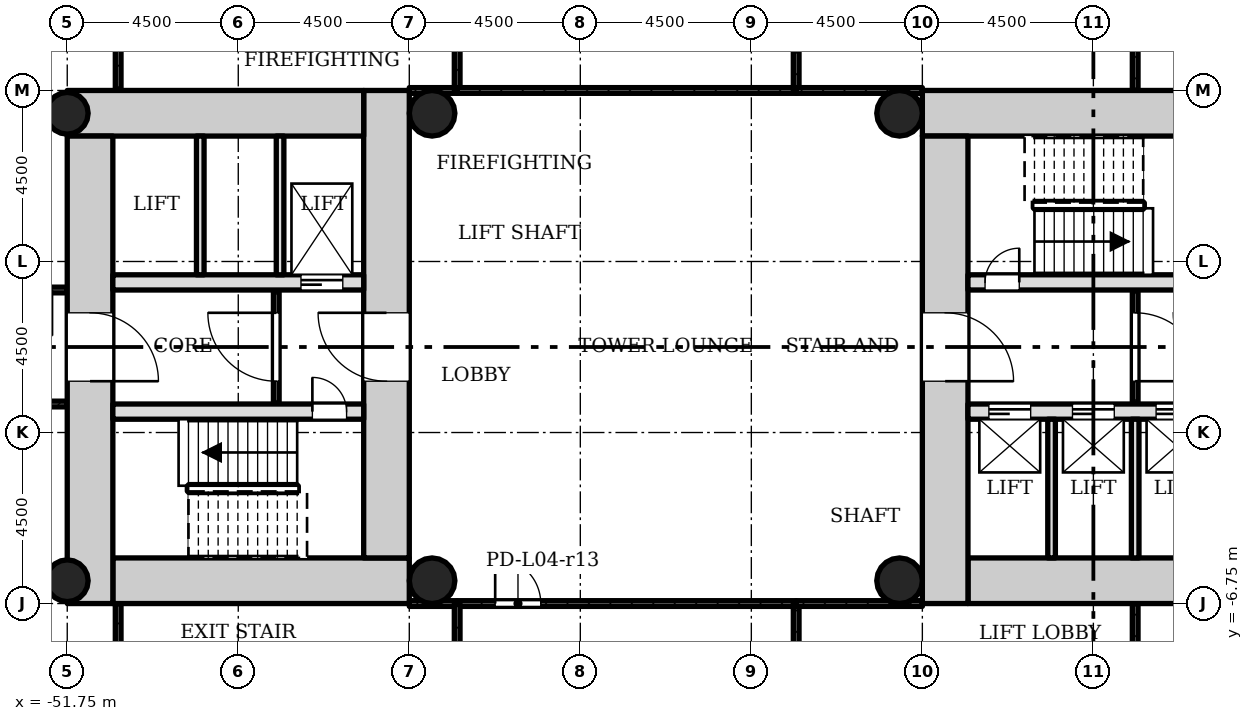
"""IFC4 building model, lengths in metres.
Left out: names, types, materials, properties, quantities, classifications, styles, units other than length and angle.
Written with IfcOpenShell. Run it as: python <this file> out.ifc"""

import sys

from ifc_helpers import new_model, si_unit, direction, frame, frame_2d, origin, origin_2d, place, context, subcontext, project, spatial, rectangle, hollow_circle, extrude, element, fill, save


model = new_model("IFC4")
c1 = context("Model", 3, precision=1e-05, world=origin(), true_north=direction((0.0, 1.0)))
c2 = subcontext(c1, "Body", "Model", "MODEL_VIEW")
j1 = project(units=[si_unit("LENGTHUNIT", "METRE"), si_unit("PLANEANGLEUNIT", "RADIAN")], contexts=[c1])
p1 = place(None, origin())
s1 = spatial("IfcSite", under=j1, at=p1, CompositionType="ELEMENT")
p2 = place(p1, origin())
s2 = spatial("IfcBuilding", under=s1, at=p2, CompositionType="ELEMENT")
p3 = place(p2, frame((0.0, 0.0, 20.0)))
s3 = spatial("IfcBuildingStorey", under=s2, at=p3, CompositionType="ELEMENT", Elevation=20.0)
for number, where, z_axis, x_axis in (
    (1, (-28.05, -6.15, 0.0), (0.0, 0.0, 1.0), (1.0, 0.0, 0.0)),
    (2, (-21.45, 6.15, 0.0), (0.0, 0.0, 1.0), (-1.0, 0.0, 0.0)),
):
    element("IfcWall", number, at=place(p3, frame(where, z_axis=z_axis, x_axis=x_axis)), inside=s3, PredefinedType="SHEAR", context=c2, shape_type="SweptSolid", body=[
        extrude(rectangle(XDim=7.8, YDim=1.2, at=frame_2d((3.9, 0.0))), origin(), (0.0, 0.0, 1.0), 4.5),
    ])
p4 = place(p3, frame((-28.65, 5.55, 0.0), z_axis=(0.0, 0.0, 1.0), x_axis=(0.0, -1.0, 0.0)))
e3 = element("IfcWall", 3, at=p4, inside=s3, PredefinedType="SHEAR", context=c2, shape_type="SweptSolid", body=[
    extrude(rectangle(XDim=12.3, YDim=1.2, at=frame_2d((6.15, 0.0))), origin(), (0.0, 0.0, 1.0), 4.5),
])
p5 = place(p4, frame((4.65, 0.0, 0.0)))
e4 = element("IfcOpeningElement", 4, at=p5, cuts=e3, PredefinedType="OPENING", context=c2, shape_type="SweptSolid", body=[
    extrude(rectangle(XDim=1.8, YDim=2.1, at=frame_2d((0.9, 1.05))), frame((0.0, 0.61, 0.0), z_axis=(0.0, -1.0, 0.0), x_axis=(1.0, 0.0, 0.0)), (0.0, 0.0, 1.0), 1.22),
])
p6 = place(p3, frame((-28.05, -1.7, 0.0), z_axis=(0.0, 0.0, 1.0), x_axis=(1.0, 0.0, 0.0)))
e5 = element("IfcWall", 5, at=p6, inside=s3, PredefinedType="SHEAR", context=c2, shape_type="SweptSolid", body=[
    extrude(rectangle(XDim=6.6, YDim=0.4, at=frame_2d((3.3, 0.0))), origin(), (0.0, 0.0, 1.0), 4.5),
])
p7 = place(p6, frame((0.55, 0.0, 0.0)))
e6 = element("IfcOpeningElement", 6, at=p7, cuts=e5, PredefinedType="OPENING", context=c2, shape_type="SweptSolid", body=[
    extrude(rectangle(XDim=1.1, YDim=2.1, at=frame_2d((0.55, 1.05))), frame((0.0, 0.21, 0.0), z_axis=(0.0, -1.0, 0.0), x_axis=(1.0, 0.0, 0.0)), (0.0, 0.0, 1.0), 0.42),
])
p8 = place(p6, frame((2.75, 0.0, 0.0)))
e7 = element("IfcOpeningElement", 7, at=p8, cuts=e5, PredefinedType="OPENING", context=c2, shape_type="SweptSolid", body=[
    extrude(rectangle(XDim=1.1, YDim=2.1, at=frame_2d((0.55, 1.05))), frame((0.0, 0.21, 0.0), z_axis=(0.0, -1.0, 0.0), x_axis=(1.0, 0.0, 0.0)), (0.0, 0.0, 1.0), 0.42),
])
p9 = place(p6, frame((4.95, 0.0, 0.0)))
e8 = element("IfcOpeningElement", 8, at=p9, cuts=e5, PredefinedType="OPENING", context=c2, shape_type="SweptSolid", body=[
    extrude(rectangle(XDim=1.1, YDim=2.1, at=frame_2d((0.55, 1.05))), frame((0.0, 0.21, 0.0), z_axis=(0.0, -1.0, 0.0), x_axis=(1.0, 0.0, 0.0)), (0.0, 0.0, 1.0), 0.42),
])
p10 = place(p3, frame((-28.05, 1.7, 0.0), z_axis=(0.0, 0.0, 1.0), x_axis=(1.0, 0.0, 0.0)))
e9 = element("IfcWall", 9, at=p10, inside=s3, PredefinedType="SHEAR", context=c2, shape_type="SweptSolid", body=[
    extrude(rectangle(XDim=6.6, YDim=0.4, at=frame_2d((3.3, 0.0))), origin(), (0.0, 0.0, 1.0), 4.5),
])
p11 = place(p10, frame((0.45, 0.0, 0.0)))
e10 = element("IfcOpeningElement", 10, at=p11, cuts=e9, PredefinedType="OPENING", context=c2, shape_type="SweptSolid", body=[
    extrude(rectangle(XDim=0.9, YDim=2.1, at=frame_2d((0.45, 1.05))), frame((0.0, 0.21, 0.0), z_axis=(0.0, -1.0, 0.0), x_axis=(1.0, 0.0, 0.0)), (0.0, 0.0, 1.0), 0.42),
])
p12 = place(p3, frame((-50.55, -6.15, 0.0), z_axis=(0.0, 0.0, 1.0), x_axis=(1.0, 0.0, 0.0)))
e11 = element("IfcWall", 11, at=p12, inside=s3, PredefinedType="SHEAR", context=c2, shape_type="SweptSolid", body=[
    extrude(rectangle(XDim=7.8, YDim=1.2, at=frame_2d((3.9, 0.0))), origin(), (0.0, 0.0, 1.0), 4.5),
])
p13 = place(p3, frame((-43.35, -5.55, 0.0), z_axis=(0.0, 0.0, 1.0), x_axis=(0.0, 1.0, 0.0)))
e12 = element("IfcWall", 12, at=p13, inside=s3, PredefinedType="SHEAR", context=c2, shape_type="SweptSolid", body=[
    extrude(rectangle(XDim=12.3, YDim=1.2, at=frame_2d((6.15, 0.0))), origin(), (0.0, 0.0, 1.0), 4.5),
])
p14 = place(p13, frame((4.65, 0.0, 0.0)))
e13 = element("IfcOpeningElement", 13, at=p14, cuts=e12, PredefinedType="OPENING", context=c2, shape_type="SweptSolid", body=[
    extrude(rectangle(XDim=1.8, YDim=2.1, at=frame_2d((0.9, 1.05))), frame((0.0, 0.61, 0.0), z_axis=(0.0, -1.0, 0.0), x_axis=(1.0, 0.0, 0.0)), (0.0, 0.0, 1.0), 1.22),
])
p15 = place(p3, frame((-43.95, 6.15, 0.0), z_axis=(0.0, 0.0, 1.0), x_axis=(-1.0, 0.0, 0.0)))
e14 = element("IfcWall", 14, at=p15, inside=s3, PredefinedType="SHEAR", context=c2, shape_type="SweptSolid", body=[
    extrude(rectangle(XDim=7.8, YDim=1.2, at=frame_2d((3.9, 0.0))), origin(), (0.0, 0.0, 1.0), 4.5),
])
p16 = place(p3, frame((-51.15, 5.55, 0.0), z_axis=(0.0, 0.0, 1.0), x_axis=(0.0, -1.0, 0.0)))
e15 = element("IfcWall", 15, at=p16, inside=s3, PredefinedType="SHEAR", context=c2, shape_type="SweptSolid", body=[
    extrude(rectangle(XDim=12.3, YDim=1.2, at=frame_2d((6.15, 0.0))), origin(), (0.0, 0.0, 1.0), 4.5),
])
p17 = place(p16, frame((4.65, 0.0, 0.0)))
e16 = element("IfcOpeningElement", 16, at=p17, cuts=e15, PredefinedType="OPENING", context=c2, shape_type="SweptSolid", body=[
    extrude(rectangle(XDim=1.8, YDim=2.1, at=frame_2d((0.9, 1.05))), frame((0.0, 0.61, 0.0), z_axis=(0.0, -1.0, 0.0), x_axis=(1.0, 0.0, 0.0)), (0.0, 0.0, 1.0), 1.22),
])
p18 = place(p3, frame((-50.55, -1.7, 0.0), z_axis=(0.0, 0.0, 1.0), x_axis=(1.0, 0.0, 0.0)))
e17 = element("IfcWall", 17, at=p18, inside=s3, PredefinedType="SHEAR", context=c2, shape_type="SweptSolid", body=[
    extrude(rectangle(XDim=6.6, YDim=0.4, at=frame_2d((3.3, 0.0))), origin(), (0.0, 0.0, 1.0), 4.5),
])
p19 = place(p18, frame((5.25, 0.0, 0.0)))
e18 = element("IfcOpeningElement", 18, at=p19, cuts=e17, PredefinedType="OPENING", context=c2, shape_type="SweptSolid", body=[
    extrude(rectangle(XDim=0.9, YDim=2.1, at=frame_2d((0.45, 1.05))), frame((0.0, 0.21, 0.0), z_axis=(0.0, -1.0, 0.0), x_axis=(1.0, 0.0, 0.0)), (0.0, 0.0, 1.0), 0.42),
])
p20 = place(p3, frame((-50.55, 1.7, 0.0), z_axis=(0.0, 0.0, 1.0), x_axis=(1.0, 0.0, 0.0)))
e19 = element("IfcWall", 19, at=p20, inside=s3, PredefinedType="SHEAR", context=c2, shape_type="SweptSolid", body=[
    extrude(rectangle(XDim=6.6, YDim=0.4, at=frame_2d((3.3, 0.0))), origin(), (0.0, 0.0, 1.0), 4.5),
])
p21 = place(p20, frame((4.95, 0.0, 0.0)))
e20 = element("IfcOpeningElement", 20, at=p21, cuts=e19, PredefinedType="OPENING", context=c2, shape_type="SweptSolid", body=[
    extrude(rectangle(XDim=1.1, YDim=2.1, at=frame_2d((0.55, 1.05))), frame((0.0, 0.21, 0.0), z_axis=(0.0, -1.0, 0.0), x_axis=(1.0, 0.0, 0.0)), (0.0, 0.0, 1.0), 0.42),
])
for number, where, z_axis, x_axis in (
    (21, (-51.75, -6.15, 0.0), (0.0, 0.0, 1.0), (1.0, 0.0, 0.0)),
    (22, (-51.75, 6.15, 0.0), (0.0, 0.0, 1.0), (1.0, 0.0, 0.0)),
):
    element("IfcColumn", number, at=place(p3, frame(where, z_axis=z_axis, x_axis=x_axis)), inside=s3, PredefinedType="COLUMN", context=c2, shape_type="SweptSolid", body=[
        extrude(hollow_circle(Radius=0.55, WallThickness=0.04, at=origin_2d()), origin(), (0.0, 0.0, 1.0), 4.5),
    ])
for number, where, z_axis, x_axis in (
    (23, (-42.15, -6.15, 0.0), (0.0, 0.0, 1.0), (1.0, 0.0, 0.0)),
    (24, (-29.85, -6.15, 0.0), (0.0, 0.0, 1.0), (1.0, 0.0, 0.0)),
    (25, (-29.85, 6.15, 0.0), (0.0, 0.0, 1.0), (1.0, 0.0, 0.0)),
    (26, (-42.15, 6.15, 0.0), (0.0, 0.0, 1.0), (1.0, 0.0, 0.0)),
):
    element("IfcColumn", number, at=place(p3, frame(where, z_axis=z_axis, x_axis=x_axis)), inside=s3, PredefinedType="COLUMN", context=c2, shape_type="SweptSolid", body=[
        extrude(hollow_circle(Radius=0.6, WallThickness=0.045, at=origin_2d()), origin(), (0.0, 0.0, 1.0), 4.5),
    ])
p22 = place(p3, frame((-23.65, -1.5, 0.0), z_axis=(0.0, 0.0, 1.0), x_axis=(0.0, 1.0, 0.0)))
e27 = element("IfcWall", 27, at=p22, inside=s3, PredefinedType="PARTITIONING", context=c2, shape_type="SweptSolid", body=[
    extrude(rectangle(XDim=3.0, YDim=0.15, at=frame_2d((1.5, 0.0))), origin(), (0.0, 0.0, 1.0), 4.075),
])
p23 = place(p22, frame((0.6, 0.0, 0.0)))
e28 = element("IfcOpeningElement", 28, at=p23, cuts=e27, PredefinedType="OPENING", context=c2, shape_type="SweptSolid", body=[
    extrude(rectangle(XDim=1.8, YDim=2.1, at=frame_2d((0.9, 1.05))), frame((0.0, 0.085, 0.0), z_axis=(0.0, -1.0, 0.0), x_axis=(1.0, 0.0, 0.0)), (0.0, 0.0, 1.0), 0.17),
])
for number, where, z_axis, x_axis in (
    (29, (-25.85, -5.55, 0.0), (0.0, 0.0, 1.0), (0.0, 1.0, 0.0)),
    (30, (-23.65, -5.55, 0.0), (0.0, 0.0, 1.0), (0.0, 1.0, 0.0)),
):
    element("IfcWall", number, at=place(p3, frame(where, z_axis=z_axis, x_axis=x_axis)), inside=s3, PredefinedType="SOLIDWALL", context=c2, shape_type="SweptSolid", body=[
        extrude(rectangle(XDim=3.65, YDim=0.2, at=frame_2d((1.825, 0.0))), origin(), (0.0, 0.0, 1.0), 4.075),
    ])
p24 = place(p3, frame((-46.25, 1.5, 0.0), z_axis=(0.0, 0.0, 1.0), x_axis=(0.0, -1.0, 0.0)))
e31 = element("IfcWall", 31, at=p24, inside=s3, PredefinedType="PARTITIONING", context=c2, shape_type="SweptSolid", body=[
    extrude(rectangle(XDim=3.0, YDim=0.15, at=frame_2d((1.5, 0.0))), origin(), (0.0, 0.0, 1.0), 4.075),
])
p25 = place(p24, frame((0.6, 0.0, 0.0)))
e32 = element("IfcOpeningElement", 32, at=p25, cuts=e31, PredefinedType="OPENING", context=c2, shape_type="SweptSolid", body=[
    extrude(rectangle(XDim=1.8, YDim=2.1, at=frame_2d((0.9, 1.05))), frame((0.0, 0.085, 0.0), z_axis=(0.0, -1.0, 0.0), x_axis=(1.0, 0.0, 0.0)), (0.0, 0.0, 1.0), 0.17),
])
for number, where, z_axis, x_axis in (
    (33, (-46.15, 5.55, 0.0), (0.0, 0.0, 1.0), (0.0, -1.0, 0.0)),
    (34, (-48.25, 5.55, 0.0), (0.0, 0.0, 1.0), (0.0, -1.0, 0.0)),
):
    element("IfcWall", number, at=place(p3, frame(where, z_axis=z_axis, x_axis=x_axis)), inside=s3, PredefinedType="SOLIDWALL", context=c2, shape_type="SweptSolid", body=[
        extrude(rectangle(XDim=3.65, YDim=0.2, at=frame_2d((1.825, 0.0))), origin(), (0.0, 0.0, 1.0), 4.075),
    ])
p26 = place(p3, frame((-59.33, -1.5, 0.0), z_axis=(0.0, 0.0, 1.0), x_axis=(1.0, 0.0, 0.0)))
e35 = element("IfcWall", 35, at=p26, inside=s3, PredefinedType="PARTITIONING", context=c2, shape_type="SweptSolid", body=[
    extrude(rectangle(XDim=7.58, YDim=0.15, at=frame_2d((3.79, 0.0))), origin(), (0.0, 0.0, 1.0), 4.075),
])
p27 = place(p26, frame((0.4, 0.0, 0.0)))
e36 = element("IfcOpeningElement", 36, at=p27, cuts=e35, PredefinedType="OPENING", context=c2, shape_type="SweptSolid", body=[
    extrude(rectangle(XDim=1.2, YDim=2.1, at=frame_2d((0.6, 1.05))), frame((0.0, 0.085, 0.0), z_axis=(0.0, -1.0, 0.0), x_axis=(1.0, 0.0, 0.0)), (0.0, 0.0, 1.0), 0.17),
])
p28 = place(p3, frame((-50.41, -6.75, 0.0), z_axis=(0.0, 0.0, 1.0), x_axis=(0.0, -1.0, 0.0)))
e37 = element("IfcWall", 37, at=p28, inside=s3, PredefinedType="PARTITIONING", context=c2, shape_type="SweptSolid", body=[
    extrude(rectangle(XDim=16.75, YDim=0.15, at=frame_2d((8.375, 0.0))), origin(), (0.0, 0.0, 1.0), 4.075),
])
p29 = place(p3, frame((-51.75, 1.5, 0.0), z_axis=(0.0, 0.0, 1.0), x_axis=(-1.0, 0.0, 0.0)))
e38 = element("IfcWall", 38, at=p29, inside=s3, PredefinedType="PARTITIONING", context=c2, shape_type="SweptSolid", body=[
    extrude(rectangle(XDim=3.58, YDim=0.15, at=frame_2d((1.79, 0.0))), origin(), (0.0, 0.0, 1.0), 4.075),
])
p30 = place(p29, frame((0.4, 0.0, 0.0)))
e39 = element("IfcOpeningElement", 39, at=p30, cuts=e38, PredefinedType="OPENING", context=c2, shape_type="SweptSolid", body=[
    extrude(rectangle(XDim=1.2, YDim=2.1, at=frame_2d((0.6, 1.05))), frame((0.0, 0.085, 0.0), z_axis=(0.0, -1.0, 0.0), x_axis=(1.0, 0.0, 0.0)), (0.0, 0.0, 1.0), 0.17),
])
for number, where, z_axis, x_axis in (
    (40, (-42.75, -6.75, 0.0), (0.0, 0.0, 1.0), (1.0, 0.0, 0.0)),
    (41, (-41.49, 6.75, 0.0), (0.0, 0.0, 1.0), (-1.0, 0.0, 0.0)),
):
    element("IfcWall", number, at=place(p3, frame(where, z_axis=z_axis, x_axis=x_axis)), inside=s3, PredefinedType="PARTITIONING", context=c2, shape_type="SweptSolid", body=[
        extrude(rectangle(XDim=1.26, YDim=0.15, at=frame_2d((0.63, 0.0))), origin(), (0.0, 0.0, 1.0), 4.075),
    ])
for number, where, z_axis, x_axis in (
    (42, (-50.41, 6.75, 0.0), (0.0, 0.0, 1.0), (0.0, 1.0, 0.0)),
    (43, (-41.49, 26.5, 0.0), (0.0, 0.0, 1.0), (0.0, -1.0, 0.0)),
):
    element("IfcWall", number, at=place(p3, frame(where, z_axis=z_axis, x_axis=x_axis)), inside=s3, PredefinedType="PARTITIONING", context=c2, shape_type="SweptSolid", body=[
        extrude(rectangle(XDim=19.75, YDim=0.15, at=frame_2d((9.875, 0.0))), origin(), (0.0, 0.0, 1.0), 4.075),
    ])
p31 = place(p3, frame((-41.49, -6.75, 0.0), z_axis=(0.0, 0.0, 1.0), x_axis=(1.0, 0.0, 0.0)))
e44 = element("IfcWall", 44, at=p31, inside=s3, PredefinedType="PARTITIONING", context=c2, shape_type="SweptSolid", body=[
    extrude(rectangle(XDim=8.92, YDim=0.15, at=frame_2d((4.46, 0.0))), origin(), (0.0, 0.0, 1.0), 4.075),
])
p32 = place(p31, frame((1.0, 0.0, 0.0)))
e45 = element("IfcOpeningElement", 45, at=p32, cuts=e44, PredefinedType="OPENING", context=c2, shape_type="SweptSolid", body=[
    extrude(rectangle(XDim=1.2, YDim=2.1, at=frame_2d((0.6, 1.05))), frame((0.0, 0.085, 0.0), z_axis=(0.0, -1.0, 0.0), x_axis=(1.0, 0.0, 0.0)), (0.0, 0.0, 1.0), 0.17),
])
for number, where, z_axis, x_axis in (
    (46, (-41.49, -23.5, 0.0), (0.0, 0.0, 1.0), (0.0, 1.0, 0.0)),
    (47, (-32.57, -6.75, 0.0), (0.0, 0.0, 1.0), (0.0, -1.0, 0.0)),
):
    element("IfcWall", number, at=place(p3, frame(where, z_axis=z_axis, x_axis=x_axis)), inside=s3, PredefinedType="PARTITIONING", context=c2, shape_type="SweptSolid", body=[
        extrude(rectangle(XDim=16.75, YDim=0.15, at=frame_2d((8.375, 0.0))), origin(), (0.0, 0.0, 1.0), 4.075),
    ])
p33 = place(p3, frame((-32.57, 6.75, 0.0), z_axis=(0.0, 0.0, 1.0), x_axis=(-1.0, 0.0, 0.0)))
e48 = element("IfcWall", 48, at=p33, inside=s3, PredefinedType="PARTITIONING", context=c2, shape_type="SweptSolid", body=[
    extrude(rectangle(XDim=8.92, YDim=0.15, at=frame_2d((4.46, 0.0))), origin(), (0.0, 0.0, 1.0), 4.075),
])
p34 = place(p3, frame((-32.57, 26.5, 0.0), z_axis=(0.0, 0.0, 1.0), x_axis=(0.0, -1.0, 0.0)))
e49 = element("IfcWall", 49, at=p34, inside=s3, PredefinedType="PARTITIONING", context=c2, shape_type="SweptSolid", body=[
    extrude(rectangle(XDim=19.75, YDim=0.15, at=frame_2d((9.875, 0.0))), origin(), (0.0, 0.0, 1.0), 4.075),
])
p35 = place(p3, frame((-32.57, -6.75, 0.0), z_axis=(0.0, 0.0, 1.0), x_axis=(1.0, 0.0, 0.0)))
e50 = element("IfcWall", 50, at=p35, inside=s3, PredefinedType="PARTITIONING", context=c2, shape_type="SweptSolid", body=[
    extrude(rectangle(XDim=3.32, YDim=0.15, at=frame_2d((1.66, 0.0))), origin(), (0.0, 0.0, 1.0), 4.075),
])
p36 = place(p3, frame((-23.65, -6.75, 0.0), z_axis=(0.0, 0.0, 1.0), x_axis=(0.0, -1.0, 0.0)))
e51 = element("IfcWall", 51, at=p36, inside=s3, PredefinedType="PARTITIONING", context=c2, shape_type="SweptSolid", body=[
    extrude(rectangle(XDim=16.75, YDim=0.15, at=frame_2d((8.375, 0.0))), origin(), (0.0, 0.0, 1.0), 4.075),
])
p37 = place(p3, frame((-29.25, 6.75, 0.0), z_axis=(0.0, 0.0, 1.0), x_axis=(-1.0, 0.0, 0.0)))
e52 = element("IfcWall", 52, at=p37, inside=s3, PredefinedType="PARTITIONING", context=c2, shape_type="SweptSolid", body=[
    extrude(rectangle(XDim=3.32, YDim=0.15, at=frame_2d((1.66, 0.0))), origin(), (0.0, 0.0, 1.0), 4.075),
])
p38 = place(p3, frame((-23.65, 26.5, 0.0), z_axis=(0.0, 0.0, 1.0), x_axis=(0.0, -1.0, 0.0)))
e53 = element("IfcWall", 53, at=p38, inside=s3, PredefinedType="PARTITIONING", context=c2, shape_type="SweptSolid", body=[
    extrude(rectangle(XDim=19.75, YDim=0.15, at=frame_2d((9.875, 0.0))), origin(), (0.0, 0.0, 1.0), 4.075),
])
p39 = place(p23, origin())
e54 = element("IfcDoor", 54, at=p39, inside=s3, OperationType="SINGLE_SWING_LEFT", PredefinedType="DOOR", context=c2, shape_type="SweptSolid", body=[
    extrude(rectangle(XDim=1.8, YDim=2.1, at=frame_2d((0.9, 1.05))), frame((0.0, 0.025, 0.0), z_axis=(0.0, -1.0, 0.0), x_axis=(1.0, 0.0, 0.0)), (0.0, 0.0, 1.0), 0.05),
])
fill(e28, e54)
p40 = place(p25, origin())
e55 = element("IfcDoor", 55, at=p40, inside=s3, OperationType="SINGLE_SWING_LEFT", PredefinedType="DOOR", context=c2, shape_type="SweptSolid", body=[
    extrude(rectangle(XDim=1.8, YDim=2.1, at=frame_2d((0.9, 1.05))), frame((0.0, 0.025, 0.0), z_axis=(0.0, -1.0, 0.0), x_axis=(1.0, 0.0, 0.0)), (0.0, 0.0, 1.0), 0.05),
])
fill(e32, e55)
p41 = place(p32, origin())
e56 = element("IfcDoor", 56, at=p41, inside=s3, OperationType="SINGLE_SWING_RIGHT", PredefinedType="DOOR", context=c2, shape_type="SweptSolid", body=[
    extrude(rectangle(XDim=1.2, YDim=2.1, at=frame_2d((0.6, 1.05))), frame((0.0, 0.025, 0.0), z_axis=(0.0, -1.0, 0.0), x_axis=(1.0, 0.0, 0.0)), (0.0, 0.0, 1.0), 0.05),
])
fill(e45, e56)
p42 = place(p11, origin())
e57 = element("IfcDoor", 57, at=p42, inside=s3, OperationType="SINGLE_SWING_LEFT", PredefinedType="DOOR", context=c2, shape_type="SweptSolid", body=[
    extrude(rectangle(XDim=0.9, YDim=2.1, at=frame_2d((0.45, 1.05))), frame((0.0, 0.025, 0.0), z_axis=(0.0, -1.0, 0.0), x_axis=(1.0, 0.0, 0.0)), (0.0, 0.0, 1.0), 0.05),
])
fill(e10, e57)
p43 = place(p7, origin())
e58 = element("IfcDoor", 58, at=p43, inside=s3, OperationType="SLIDING_TO_LEFT", PredefinedType="DOOR", context=c2, shape_type="SweptSolid", body=[
    extrude(rectangle(XDim=1.1, YDim=2.1, at=frame_2d((0.55, 1.05))), frame((0.0, 0.025, 0.0), z_axis=(0.0, -1.0, 0.0), x_axis=(1.0, 0.0, 0.0)), (0.0, 0.0, 1.0), 0.05),
])
fill(e6, e58)
p44 = place(p8, origin())
e59 = element("IfcDoor", 59, at=p44, inside=s3, OperationType="SLIDING_TO_LEFT", PredefinedType="DOOR", context=c2, shape_type="SweptSolid", body=[
    extrude(rectangle(XDim=1.1, YDim=2.1, at=frame_2d((0.55, 1.05))), frame((0.0, 0.025, 0.0), z_axis=(0.0, -1.0, 0.0), x_axis=(1.0, 0.0, 0.0)), (0.0, 0.0, 1.0), 0.05),
])
fill(e7, e59)
p45 = place(p9, origin())
e60 = element("IfcDoor", 60, at=p45, inside=s3, OperationType="SLIDING_TO_LEFT", PredefinedType="DOOR", context=c2, shape_type="SweptSolid", body=[
    extrude(rectangle(XDim=1.1, YDim=2.1, at=frame_2d((0.55, 1.05))), frame((0.0, 0.025, 0.0), z_axis=(0.0, -1.0, 0.0), x_axis=(1.0, 0.0, 0.0)), (0.0, 0.0, 1.0), 0.05),
])
fill(e8, e60)
p46 = place(p5, origin())
e61 = element("IfcDoor", 61, at=p46, inside=s3, OperationType="SINGLE_SWING_LEFT", PredefinedType="DOOR", context=c2, shape_type="SweptSolid", body=[
    extrude(rectangle(XDim=1.8, YDim=2.1, at=frame_2d((0.9, 1.05))), frame((0.0, 0.025, 0.0), z_axis=(0.0, -1.0, 0.0), x_axis=(1.0, 0.0, 0.0)), (0.0, 0.0, 1.0), 0.05),
])
fill(e4, e61)
p47 = place(p19, origin())
e62 = element("IfcDoor", 62, at=p47, inside=s3, OperationType="SINGLE_SWING_RIGHT", PredefinedType="DOOR", context=c2, shape_type="SweptSolid", body=[
    extrude(rectangle(XDim=0.9, YDim=2.1, at=frame_2d((0.45, 1.05))), frame((0.0, 0.025, 0.0), z_axis=(0.0, -1.0, 0.0), x_axis=(1.0, 0.0, 0.0)), (0.0, 0.0, 1.0), 0.05),
])
fill(e18, e62)
p48 = place(p21, origin())
e63 = element("IfcDoor", 63, at=p48, inside=s3, OperationType="SLIDING_TO_LEFT", PredefinedType="DOOR", context=c2, shape_type="SweptSolid", body=[
    extrude(rectangle(XDim=1.1, YDim=2.1, at=frame_2d((0.55, 1.05))), frame((0.0, 0.025, 0.0), z_axis=(0.0, -1.0, 0.0), x_axis=(1.0, 0.0, 0.0)), (0.0, 0.0, 1.0), 0.05),
])
fill(e20, e63)
p49 = place(p14, origin())
e64 = element("IfcDoor", 64, at=p49, inside=s3, OperationType="SINGLE_SWING_LEFT", PredefinedType="DOOR", context=c2, shape_type="SweptSolid", body=[
    extrude(rectangle(XDim=1.8, YDim=2.1, at=frame_2d((0.9, 1.05))), frame((0.0, 0.025, 0.0), z_axis=(0.0, -1.0, 0.0), x_axis=(1.0, 0.0, 0.0)), (0.0, 0.0, 1.0), 0.05),
])
fill(e13, e64)
p50 = place(p17, origin())
e65 = element("IfcDoor", 65, at=p50, inside=s3, OperationType="SINGLE_SWING_LEFT", PredefinedType="DOOR", context=c2, shape_type="SweptSolid", body=[
    extrude(rectangle(XDim=1.8, YDim=2.1, at=frame_2d((0.9, 1.05))), frame((0.0, 0.025, 0.0), z_axis=(0.0, -1.0, 0.0), x_axis=(1.0, 0.0, 0.0)), (0.0, 0.0, 1.0), 0.05),
])
fill(e16, e65)
save(model, sys.argv[1])
